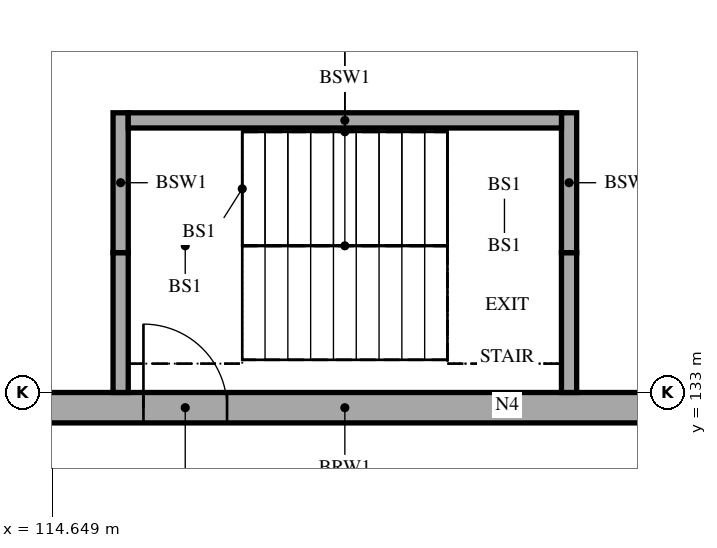
"""IFC4 building model, lengths in metres.
Left out: names, types, materials, properties, quantities, classifications, styles, units other than length and angle.
Written with IfcOpenShell. Run it as: python <this file> out.ifc"""

import sys

from ifc_helpers import new_model, si_unit, direction, frame, frame_2d, origin, place, context, subcontext, project, spatial, rectangle, extrude, element, fill, save


model = new_model("IFC4")
c1 = context("Model", 3, precision=1e-05, world=origin(), true_north=direction((0.0, 1.0)))
c2 = subcontext(c1, "Body", "Model", "MODEL_VIEW")
j1 = project(units=[si_unit("LENGTHUNIT", "METRE"), si_unit("PLANEANGLEUNIT", "RADIAN")], contexts=[c1])
p1 = place(None, origin())
s1 = spatial("IfcSite", under=j1, at=p1, CompositionType="ELEMENT")
p2 = place(p1, origin())
s2 = spatial("IfcBuilding", under=s1, at=p2, CompositionType="ELEMENT")
p3 = place(p2, frame((0.0, 0.0, -4.2)))
s3 = spatial("IfcBuildingStorey", under=s2, at=p3, CompositionType="ELEMENT", Elevation=-4.2)
p4 = place(p3, frame((114.4, 132.8, 0.0), z_axis=(0.0, 0.0, 1.0), x_axis=(1.0, 0.0, 0.0)))
e1 = element("IfcWall", 1, at=p4, inside=s3, PredefinedType="SOLIDWALL", context=c2, shape_type="SweptSolid", body=[
    extrude(rectangle(XDim=8.2, YDim=0.4, at=frame_2d((4.1, 0.0))), origin(), (0.0, 0.0, 1.0), 4.2),
])
p5 = place(p4, frame((1.45, 0.0, 0.0)))
e2 = element("IfcOpeningElement", 2, at=p5, cuts=e1, PredefinedType="OPENING", context=c2, shape_type="SweptSolid", body=[
    extrude(rectangle(XDim=1.1, YDim=2.1, at=frame_2d((0.55, 1.05))), frame((0.0, 0.21, 0.0), z_axis=(0.0, -1.0, 0.0), x_axis=(1.0, 0.0, 0.0)), (0.0, 0.0, 1.0), 0.42),
])
p6 = place(p3, frame((121.45, 133.0, 0.0), z_axis=(0.0, 0.0, 1.0), x_axis=(0.0, 1.0, 0.0)))
e3 = element("IfcWall", 3, at=p6, inside=s3, PredefinedType="SOLIDWALL", context=c2, shape_type="SweptSolid", body=[
    extrude(rectangle(XDim=1.84, YDim=0.2, at=frame_2d((0.92, 0.0))), origin(), (0.0, 0.0, 1.0), 4.2),
])
p7 = place(p3, frame((121.45, 134.84, 0.0), z_axis=(0.0, 0.0, 1.0), x_axis=(0.0, 1.0, 0.0)))
e4 = element("IfcWall", 4, at=p7, inside=s3, PredefinedType="SOLIDWALL", context=c2, shape_type="SweptSolid", body=[
    extrude(rectangle(XDim=1.84, YDim=0.2, at=frame_2d((0.92, 0.0))), origin(), (0.0, 0.0, 1.0), 4.2),
])
p8 = place(p3, frame((115.55, 133.0, 0.0), z_axis=(0.0, 0.0, 1.0), x_axis=(0.0, 1.0, 0.0)))
e5 = element("IfcWall", 5, at=p8, inside=s3, PredefinedType="SOLIDWALL", context=c2, shape_type="SweptSolid", body=[
    extrude(rectangle(XDim=1.84, YDim=0.2, at=frame_2d((0.92, 0.0))), origin(), (0.0, 0.0, 1.0), 4.2),
])
p9 = place(p3, frame((115.55, 134.84, 0.0), z_axis=(0.0, 0.0, 1.0), x_axis=(0.0, 1.0, 0.0)))
e6 = element("IfcWall", 6, at=p9, inside=s3, PredefinedType="SOLIDWALL", context=c2, shape_type="SweptSolid", body=[
    extrude(rectangle(XDim=1.84, YDim=0.2, at=frame_2d((0.92, 0.0))), origin(), (0.0, 0.0, 1.0), 4.2),
])
p10 = place(p3, frame((121.35, 136.58, 0.0), z_axis=(0.0, 0.0, 1.0), x_axis=(-1.0, 0.0, 0.0)))
e7 = element("IfcWall", 7, at=p10, inside=s3, PredefinedType="SOLIDWALL", context=c2, shape_type="SweptSolid", body=[
    extrude(rectangle(XDim=5.7, YDim=0.2, at=frame_2d((2.85, 0.0))), origin(), (0.0, 0.0, 1.0), 4.2),
])
p11 = place(p5, origin())
e8 = element("IfcDoor", 8, at=p11, inside=s3, OperationType="SINGLE_SWING_LEFT", PredefinedType="DOOR", context=c2, shape_type="SweptSolid", body=[
    extrude(rectangle(XDim=1.1, YDim=2.1, at=frame_2d((0.55, 1.05))), frame((0.0, 0.025, 0.0), z_axis=(0.0, -1.0, 0.0), x_axis=(1.0, 0.0, 0.0)), (0.0, 0.0, 1.0), 0.05),
])
fill(e2, e8)
save(model, sys.argv[1])
